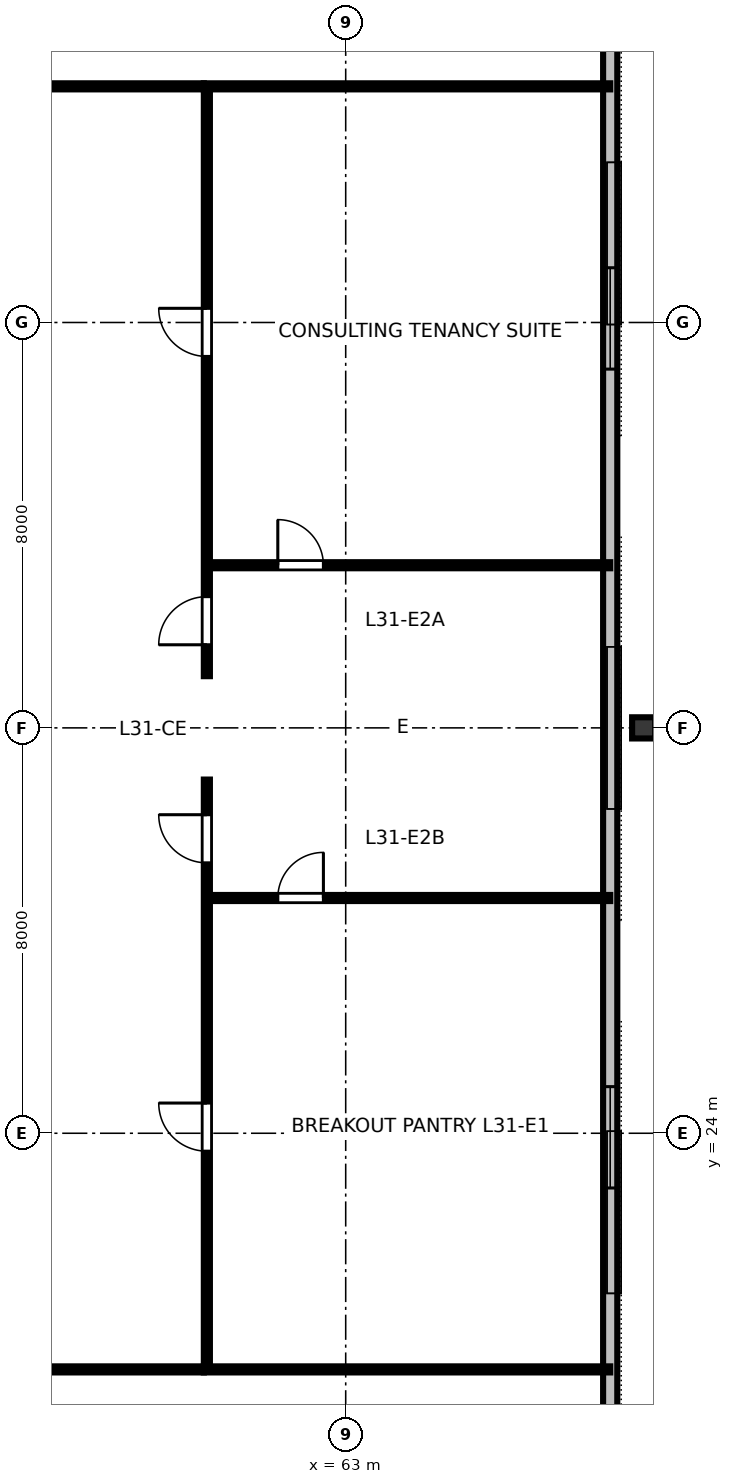
"""IFC4 building model, lengths in metres.
Left out: names, types, materials, properties, quantities, classifications, styles, units other than length and angle.
Written with IfcOpenShell. Run it as: python <this file> out.ifc"""

import sys

from ifc_helpers import new_model, si_unit, direction, frame, frame_2d, origin, origin_2d, place, context, subcontext, project, spatial, rectangle, i_section, extrude, element, fill, save


model = new_model("IFC4")
c1 = context("Model", 3, precision=1e-05, world=origin(), true_north=direction((0.0, 1.0)))
c2 = subcontext(c1, "Body", "Model", "MODEL_VIEW")
j1 = project(units=[si_unit("LENGTHUNIT", "METRE"), si_unit("PLANEANGLEUNIT", "RADIAN")], contexts=[c1])
p1 = place(None, origin())
s1 = spatial("IfcSite", under=j1, at=p1, CompositionType="ELEMENT")
p2 = place(p1, origin())
s2 = spatial("IfcBuilding", under=s1, at=p2, CompositionType="ELEMENT")
p3 = place(p2, frame((0.0, 0.0, 120.4)))
s3 = spatial("IfcBuildingStorey", under=s2, at=p3, CompositionType="ELEMENT", Elevation=120.4)
p4 = place(p3, frame((68.88, 32.0, 0.0), z_axis=(0.0, 0.0, 1.0), x_axis=(0.0, 1.0, 0.0)))
e1 = element("IfcColumn", 1, at=p4, inside=s3, PredefinedType="COLUMN", context=c2, shape_type="SweptSolid", body=[
    extrude(i_section(OverallWidth=0.418, OverallDepth=0.455, WebThickness=0.042, FlangeThickness=0.068, FilletRadius=0.025, at=origin_2d()), origin(), (0.0, 0.0, 1.0), 3.358),
])
p5 = place(p3, frame((68.22, 16.76, 0.0), z_axis=(0.0, 0.0, 1.0), x_axis=(0.0, 1.0, 0.0)))
e2 = element("IfcWall", 2, at=p5, inside=s3, PredefinedType="STANDARD", context=c2, shape_type="SweptSolid", body=[
    extrude(rectangle(XDim=30.48, YDim=0.28, at=frame_2d((15.24, 0.0))), origin(), (0.0, 0.0, 1.0), 3.36),
])
p6 = place(p5, frame((6.16, 0.0, 0.8)))
e3 = element("IfcOpeningElement", 3, at=p6, cuts=e2, PredefinedType="OPENING", context=c2, shape_type="SweptSolid", body=[
    extrude(rectangle(XDim=2.0, YDim=1.95, at=frame_2d((1.0, 0.975))), frame((0.0, 0.15, 0.0), z_axis=(0.0, -1.0, 0.0), x_axis=(1.0, 0.0, 0.0)), (0.0, 0.0, 1.0), 0.3),
])
p7 = place(p5, frame((22.32, 0.0, 0.8)))
e4 = element("IfcOpeningElement", 4, at=p7, cuts=e2, PredefinedType="OPENING", context=c2, shape_type="SweptSolid", body=[
    extrude(rectangle(XDim=2.0, YDim=1.95, at=frame_2d((1.0, 0.975))), frame((0.0, 0.15, 0.0), z_axis=(0.0, -1.0, 0.0), x_axis=(1.0, 0.0, 0.0)), (0.0, 0.0, 1.0), 0.3),
])
p8 = place(p3, frame((31.8, 19.34, 0.0), z_axis=(0.0, 0.0, 1.0), x_axis=(1.0, 0.0, 0.0)))
e5 = element("IfcWall", 5, at=p8, inside=s3, PredefinedType="PARTITIONING", context=c2, shape_type="SweptSolid", body=[
    extrude(rectangle(XDim=28.4, YDim=0.12, at=frame_2d((14.2, 0.0))), origin(), (0.0, 0.0, 1.0), 2.64),
])
p9 = place(p8, frame((7.878, 0.0, 0.0)))
e6 = element("IfcOpeningElement", 6, at=p9, cuts=e5, PredefinedType="OPENING", context=c2, shape_type="SweptSolid", body=[
    extrude(rectangle(XDim=0.95, YDim=2.15, at=frame_2d((0.475, 1.075))), frame((0.0, 0.07, 0.0), z_axis=(0.0, -1.0, 0.0), x_axis=(1.0, 0.0, 0.0)), (0.0, 0.0, 1.0), 0.14),
])
p10 = place(p8, frame((21.938, 0.0, 0.0)))
e7 = element("IfcOpeningElement", 7, at=p10, cuts=e5, PredefinedType="OPENING", context=c2, shape_type="SweptSolid", body=[
    extrude(rectangle(XDim=0.95, YDim=2.15, at=frame_2d((0.475, 1.075))), frame((0.0, 0.07, 0.0), z_axis=(0.0, -1.0, 0.0), x_axis=(1.0, 0.0, 0.0)), (0.0, 0.0, 1.0), 0.14),
])
p11 = place(p3, frame((31.8, 44.66, 0.0), z_axis=(0.0, 0.0, 1.0), x_axis=(1.0, 0.0, 0.0)))
e8 = element("IfcWall", 8, at=p11, inside=s3, PredefinedType="PARTITIONING", context=c2, shape_type="SweptSolid", body=[
    extrude(rectangle(XDim=28.4, YDim=0.12, at=frame_2d((14.2, 0.0))), origin(), (0.0, 0.0, 1.0), 2.64),
])
p12 = place(p11, frame((4.747, 0.0, 0.0)))
e9 = element("IfcOpeningElement", 9, at=p12, cuts=e8, PredefinedType="OPENING", context=c2, shape_type="SweptSolid", body=[
    extrude(rectangle(XDim=0.95, YDim=2.15, at=frame_2d((0.475, 1.075))), frame((0.0, 0.07, 0.0), z_axis=(0.0, -1.0, 0.0), x_axis=(1.0, 0.0, 0.0)), (0.0, 0.0, 1.0), 0.14),
])
p13 = place(p11, frame((18.807, 0.0, 0.0)))
e10 = element("IfcOpeningElement", 10, at=p13, cuts=e8, PredefinedType="OPENING", context=c2, shape_type="SweptSolid", body=[
    extrude(rectangle(XDim=0.95, YDim=2.15, at=frame_2d((0.475, 1.075))), frame((0.0, 0.07, 0.0), z_axis=(0.0, -1.0, 0.0), x_axis=(1.0, 0.0, 0.0)), (0.0, 0.0, 1.0), 0.14),
])
p14 = place(p3, frame((60.26, 28.643, 0.0), z_axis=(0.0, 0.0, 1.0), x_axis=(1.0, 0.0, 0.0)))
e11 = element("IfcWall", 11, at=p14, inside=s3, PredefinedType="PARTITIONING", context=c2, shape_type="SweptSolid", body=[
    extrude(rectangle(XDim=7.96, YDim=0.12, at=frame_2d((3.98, 0.0))), origin(), (0.0, 0.0, 1.0), 2.64),
])
p15 = place(p14, frame((1.4, 0.0, 0.0)))
e12 = element("IfcOpeningElement", 12, at=p15, cuts=e11, PredefinedType="OPENING", context=c2, shape_type="SweptSolid", body=[
    extrude(rectangle(XDim=0.9, YDim=2.15, at=frame_2d((0.45, 1.075))), frame((0.0, 0.07, 0.0), z_axis=(0.0, -1.0, 0.0), x_axis=(1.0, 0.0, 0.0)), (0.0, 0.0, 1.0), 0.14),
])
p16 = place(p3, frame((60.26, 35.209, 0.0), z_axis=(0.0, 0.0, 1.0), x_axis=(1.0, 0.0, 0.0)))
e13 = element("IfcWall", 13, at=p16, inside=s3, PredefinedType="PARTITIONING", context=c2, shape_type="SweptSolid", body=[
    extrude(rectangle(XDim=7.96, YDim=0.12, at=frame_2d((3.98, 0.0))), origin(), (0.0, 0.0, 1.0), 2.64),
])
p17 = place(p16, frame((1.4, 0.0, 0.0)))
e14 = element("IfcOpeningElement", 14, at=p17, cuts=e13, PredefinedType="OPENING", context=c2, shape_type="SweptSolid", body=[
    extrude(rectangle(XDim=0.9, YDim=2.15, at=frame_2d((0.45, 1.075))), frame((0.0, 0.07, 0.0), z_axis=(0.0, -1.0, 0.0), x_axis=(1.0, 0.0, 0.0)), (0.0, 0.0, 1.0), 0.14),
])
p18 = place(p3, frame((60.26, 19.4, 0.0), z_axis=(0.0, 0.0, 1.0), x_axis=(0.0, 1.0, 0.0)))
e15 = element("IfcWall", 15, at=p18, inside=s3, PredefinedType="PARTITIONING", context=c2, shape_type="SweptSolid", body=[
    extrude(rectangle(XDim=11.58, YDim=0.12, at=frame_2d((5.79, 0.0))), origin(), (0.0, 0.0, 1.0), 2.64),
])
p19 = place(p18, frame((4.246, 0.0, 0.0)))
e16 = element("IfcOpeningElement", 16, at=p19, cuts=e15, PredefinedType="OPENING", context=c2, shape_type="SweptSolid", body=[
    extrude(rectangle(XDim=0.95, YDim=2.15, at=frame_2d((0.475, 1.075))), frame((0.0, 0.07, 0.0), z_axis=(0.0, -1.0, 0.0), x_axis=(1.0, 0.0, 0.0)), (0.0, 0.0, 1.0), 0.14),
])
p20 = place(p18, frame((9.936, 0.0, 0.0)))
e17 = element("IfcOpeningElement", 17, at=p20, cuts=e15, PredefinedType="OPENING", context=c2, shape_type="SweptSolid", body=[
    extrude(rectangle(XDim=0.95, YDim=2.15, at=frame_2d((0.475, 1.075))), frame((0.0, 0.07, 0.0), z_axis=(0.0, -1.0, 0.0), x_axis=(1.0, 0.0, 0.0)), (0.0, 0.0, 1.0), 0.14),
])
p21 = place(p3, frame((60.26, 33.02, 0.0), z_axis=(0.0, 0.0, 1.0), x_axis=(0.0, 1.0, 0.0)))
e18 = element("IfcWall", 18, at=p21, inside=s3, PredefinedType="PARTITIONING", context=c2, shape_type="SweptSolid", body=[
    extrude(rectangle(XDim=11.58, YDim=0.12, at=frame_2d((5.79, 0.0))), origin(), (0.0, 0.0, 1.0), 2.64),
])
p22 = place(p21, frame((0.62, 0.0, 0.0)))
e19 = element("IfcOpeningElement", 19, at=p22, cuts=e18, PredefinedType="OPENING", context=c2, shape_type="SweptSolid", body=[
    extrude(rectangle(XDim=0.95, YDim=2.15, at=frame_2d((0.475, 1.075))), frame((0.0, 0.07, 0.0), z_axis=(0.0, -1.0, 0.0), x_axis=(1.0, 0.0, 0.0)), (0.0, 0.0, 1.0), 0.14),
])
p23 = place(p21, frame((6.31, 0.0, 0.0)))
e20 = element("IfcOpeningElement", 20, at=p23, cuts=e18, PredefinedType="OPENING", context=c2, shape_type="SweptSolid", body=[
    extrude(rectangle(XDim=0.95, YDim=2.15, at=frame_2d((0.475, 1.075))), frame((0.0, 0.07, 0.0), z_axis=(0.0, -1.0, 0.0), x_axis=(1.0, 0.0, 0.0)), (0.0, 0.0, 1.0), 0.14),
])
for number, where, z_axis, x_axis in (
    (21, (60.2, 19.34, 0.0), (0.0, 0.0, 1.0), (1.0, 0.0, 0.0)),
    (22, (60.2, 44.66, 0.0), (0.0, 0.0, 1.0), (1.0, 0.0, 0.0)),
):
    element("IfcWall", number, at=place(p3, frame(where, z_axis=z_axis, x_axis=x_axis)), inside=s3, PredefinedType="PARTITIONING", context=c2, shape_type="SweptSolid", body=[
        extrude(rectangle(XDim=8.02, YDim=0.12, at=frame_2d((4.01, 0.0))), origin(), (0.0, 0.0, 1.0), 2.64),
    ])
p24 = place(p6, origin())
e23 = element("IfcWindow", 23, at=p24, inside=s3, PartitioningType="SINGLE_PANEL", PredefinedType="WINDOW", context=c2, shape_type="SweptSolid", body=[
    extrude(rectangle(XDim=2.0, YDim=1.95, at=frame_2d((1.0, 0.975))), frame((0.0, 0.03, 0.0), z_axis=(0.0, -1.0, 0.0), x_axis=(1.0, 0.0, 0.0)), (0.0, 0.0, 1.0), 0.06),
])
fill(e3, e23)
p25 = place(p7, origin())
e24 = element("IfcWindow", 24, at=p25, inside=s3, PartitioningType="SINGLE_PANEL", PredefinedType="WINDOW", context=c2, shape_type="SweptSolid", body=[
    extrude(rectangle(XDim=2.0, YDim=1.95, at=frame_2d((1.0, 0.975))), frame((0.0, 0.03, 0.0), z_axis=(0.0, -1.0, 0.0), x_axis=(1.0, 0.0, 0.0)), (0.0, 0.0, 1.0), 0.06),
])
fill(e4, e24)
p26 = place(p15, origin())
e25 = element("IfcDoor", 25, at=p26, inside=s3, OperationType="SINGLE_SWING_RIGHT", PredefinedType="DOOR", context=c2, shape_type="SweptSolid", body=[
    extrude(rectangle(XDim=0.9, YDim=2.15, at=frame_2d((0.45, 1.075))), frame((0.0, 0.025, 0.0), z_axis=(0.0, -1.0, 0.0), x_axis=(1.0, 0.0, 0.0)), (0.0, 0.0, 1.0), 0.05),
])
fill(e12, e25)
p27 = place(p17, origin())
e26 = element("IfcDoor", 26, at=p27, inside=s3, OperationType="SINGLE_SWING_LEFT", PredefinedType="DOOR", context=c2, shape_type="SweptSolid", body=[
    extrude(rectangle(XDim=0.9, YDim=2.15, at=frame_2d((0.45, 1.075))), frame((0.0, 0.025, 0.0), z_axis=(0.0, -1.0, 0.0), x_axis=(1.0, 0.0, 0.0)), (0.0, 0.0, 1.0), 0.05),
])
fill(e14, e26)
p28 = place(p19, origin())
e27 = element("IfcDoor", 27, at=p28, inside=s3, OperationType="SINGLE_SWING_RIGHT", PredefinedType="DOOR", context=c2, shape_type="SweptSolid", body=[
    extrude(rectangle(XDim=0.95, YDim=2.15, at=frame_2d((0.475, 1.075))), frame((0.0, 0.025, 0.0), z_axis=(0.0, -1.0, 0.0), x_axis=(1.0, 0.0, 0.0)), (0.0, 0.0, 1.0), 0.05),
])
fill(e16, e27)
p29 = place(p20, origin())
e28 = element("IfcDoor", 28, at=p29, inside=s3, OperationType="SINGLE_SWING_RIGHT", PredefinedType="DOOR", context=c2, shape_type="SweptSolid", body=[
    extrude(rectangle(XDim=0.95, YDim=2.15, at=frame_2d((0.475, 1.075))), frame((0.0, 0.025, 0.0), z_axis=(0.0, -1.0, 0.0), x_axis=(1.0, 0.0, 0.0)), (0.0, 0.0, 1.0), 0.05),
])
fill(e17, e28)
p30 = place(p22, origin())
e29 = element("IfcDoor", 29, at=p30, inside=s3, OperationType="SINGLE_SWING_LEFT", PredefinedType="DOOR", context=c2, shape_type="SweptSolid", body=[
    extrude(rectangle(XDim=0.95, YDim=2.15, at=frame_2d((0.475, 1.075))), frame((0.0, 0.025, 0.0), z_axis=(0.0, -1.0, 0.0), x_axis=(1.0, 0.0, 0.0)), (0.0, 0.0, 1.0), 0.05),
])
fill(e19, e29)
p31 = place(p23, origin())
e30 = element("IfcDoor", 30, at=p31, inside=s3, OperationType="SINGLE_SWING_RIGHT", PredefinedType="DOOR", context=c2, shape_type="SweptSolid", body=[
    extrude(rectangle(XDim=0.95, YDim=2.15, at=frame_2d((0.475, 1.075))), frame((0.0, 0.025, 0.0), z_axis=(0.0, -1.0, 0.0), x_axis=(1.0, 0.0, 0.0)), (0.0, 0.0, 1.0), 0.05),
])
fill(e20, e30)
save(model, sys.argv[1])
